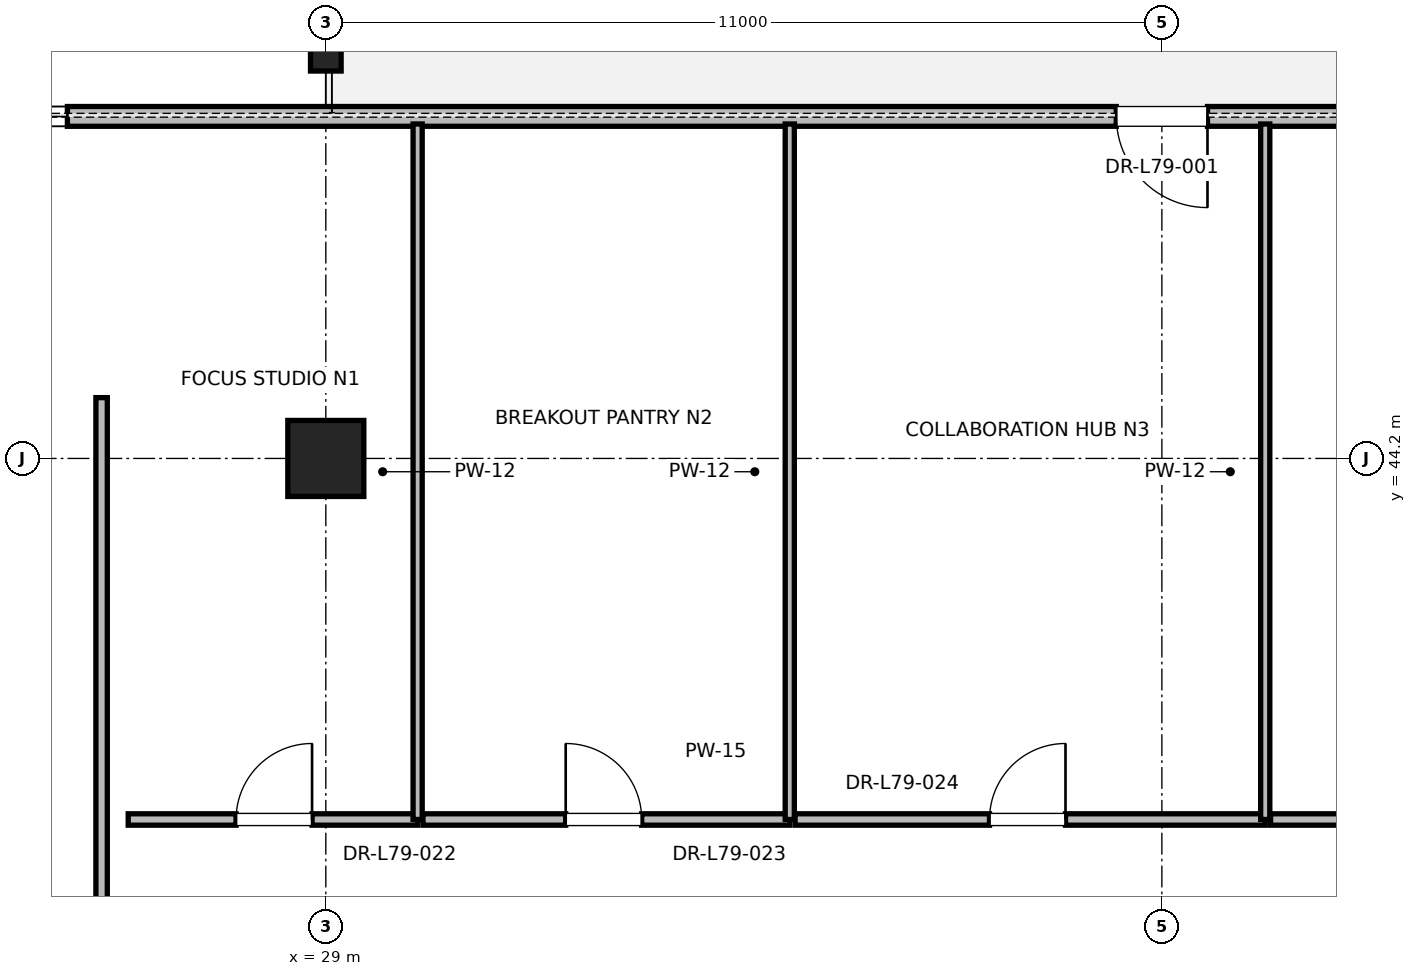
"""IFC4 building model, lengths in metres.
Left out: names, types, materials, properties, quantities, classifications, styles, units other than length and angle.
Written with IfcOpenShell. Run it as: python <this file> out.ifc"""

import sys

from ifc_helpers import new_model, si_unit, direction, frame, frame_2d, origin, origin_2d, place, context, subcontext, project, spatial, rectangle, i_section, extrude, element, fill, save


model = new_model("IFC4")
c1 = context("Model", 3, precision=1e-05, world=origin(), true_north=direction((0.0, 1.0)))
c2 = subcontext(c1, "Body", "Model", "MODEL_VIEW")
j1 = project(units=[si_unit("LENGTHUNIT", "METRE"), si_unit("PLANEANGLEUNIT", "RADIAN")], contexts=[c1])
p1 = place(None, origin())
s1 = spatial("IfcSite", under=j1, at=p1, CompositionType="ELEMENT")
p2 = place(p1, origin())
s2 = spatial("IfcBuilding", under=s1, at=p2, CompositionType="ELEMENT")
p3 = place(p2, frame((0.0, 0.0, 338.8)))
s3 = spatial("IfcBuildingStorey", under=s2, at=p3, CompositionType="ELEMENT", Elevation=338.8)
p4 = place(p3, frame((29.0, 44.2, 0.0), z_axis=(0.0, 0.0, 1.0), x_axis=(1.0, 0.0, 0.0)))
e1 = element("IfcColumn", 1, at=p4, inside=s3, PredefinedType="COLUMN", context=c2, shape_type="SweptSolid", body=[
    extrude(rectangle(XDim=1.0, YDim=1.0, at=origin_2d()), origin(), (0.0, 0.0, 1.0), 4.0),
])
p5 = place(p3, frame((29.0, 49.5, 0.0), z_axis=(0.0, 0.0, 1.0), x_axis=(1.0, 0.0, 0.0)))
e2 = element("IfcColumn", 2, at=p5, inside=s3, PredefinedType="COLUMN", context=c2, shape_type="SweptSolid", body=[
    extrude(i_section(OverallWidth=0.403, OverallDepth=0.406, WebThickness=0.027, FlangeThickness=0.043, FilletRadius=0.015, at=origin_2d()), origin(), (0.0, 0.0, 1.0), 4.0),
])
p6 = place(p3, frame((60.2, 48.7, 0.0), z_axis=(0.0, 0.0, 1.0), x_axis=(-1.0, 0.0, 0.0)))
e3 = element("IfcWall", 3, at=p6, inside=s3, PredefinedType="PARAPET", context=c2, shape_type="SweptSolid", body=[
    extrude(rectangle(XDim=40.4, YDim=0.26, at=frame_2d((20.2, 0.0))), origin(), (0.0, 0.0, 1.0), 3.7),
])
p7 = place(p6, frame((4.2, 0.0, 0.85)))
e4 = element("IfcOpeningElement", 4, at=p7, cuts=e3, PredefinedType="OPENING", context=c2, shape_type="SweptSolid", body=[
    extrude(rectangle(XDim=1.6, YDim=2.1, at=frame_2d((0.8, 1.05))), frame((0.0, 0.13, 0.0), z_axis=(0.0, -1.0, 0.0), x_axis=(1.0, 0.0, 0.0)), (0.0, 0.0, 1.0), 0.26),
])
p8 = place(p6, frame((19.6, 0.0, 0.0)))
e5 = element("IfcOpeningElement", 5, at=p8, cuts=e3, PredefinedType="OPENING", context=c2, shape_type="SweptSolid", body=[
    extrude(rectangle(XDim=1.2, YDim=2.2, at=frame_2d((0.6, 1.1))), frame((0.0, 0.13, 0.0), z_axis=(0.0, -1.0, 0.0), x_axis=(1.0, 0.0, 0.0)), (0.0, 0.0, 1.0), 0.26),
])
p9 = place(p6, frame((34.6, 0.0, 0.85)))
e6 = element("IfcOpeningElement", 6, at=p9, cuts=e3, PredefinedType="OPENING", context=c2, shape_type="SweptSolid", body=[
    extrude(rectangle(XDim=1.6, YDim=2.1, at=frame_2d((0.8, 1.05))), frame((0.0, 0.13, 0.0), z_axis=(0.0, -1.0, 0.0), x_axis=(1.0, 0.0, 0.0)), (0.0, 0.0, 1.0), 0.26),
])
p10 = place(p3, frame((26.4, 39.45, 0.0), z_axis=(0.0, 0.0, 1.0), x_axis=(1.0, 0.0, 0.0)))
e7 = element("IfcWall", 7, at=p10, inside=s3, PredefinedType="PARTITIONING", context=c2, shape_type="SweptSolid", body=[
    extrude(rectangle(XDim=3.808, YDim=0.15, at=frame_2d((1.904, 0.0))), origin(), (0.0, 0.0, 1.0), 2.753),
])
p11 = place(p10, frame((1.419, 0.0, 0.0)))
e8 = element("IfcOpeningElement", 8, at=p11, cuts=e7, PredefinedType="OPENING", context=c2, shape_type="SweptSolid", body=[
    extrude(rectangle(XDim=1.0, YDim=2.15, at=frame_2d((0.5, 1.075))), frame((0.0, 0.075, 0.0), z_axis=(0.0, -1.0, 0.0), x_axis=(1.0, 0.0, 0.0)), (0.0, 0.0, 1.0), 0.15),
])
p12 = place(p3, frame((30.208, 39.45, 0.0), z_axis=(0.0, 0.0, 1.0), x_axis=(0.0, 1.0, 0.0)))
e9 = element("IfcWall", 9, at=p12, inside=s3, PredefinedType="PARTITIONING", context=c2, shape_type="SweptSolid", body=[
    extrude(rectangle(XDim=9.15, YDim=0.12, at=frame_2d((4.575, 0.0))), origin(), (0.0, 0.0, 1.0), 2.33),
])
p13 = place(p3, frame((30.278, 39.45, 0.0), z_axis=(0.0, 0.0, 1.0), x_axis=(1.0, 0.0, 0.0)))
e10 = element("IfcWall", 10, at=p13, inside=s3, PredefinedType="PARTITIONING", context=c2, shape_type="SweptSolid", body=[
    extrude(rectangle(XDim=4.826, YDim=0.15, at=frame_2d((2.413, 0.0))), origin(), (0.0, 0.0, 1.0), 2.85),
])
p14 = place(p13, frame((1.878, 0.0, 0.0)))
e11 = element("IfcOpeningElement", 11, at=p14, cuts=e10, PredefinedType="OPENING", context=c2, shape_type="SweptSolid", body=[
    extrude(rectangle(XDim=1.0, YDim=2.15, at=frame_2d((0.5, 1.075))), frame((0.0, 0.075, 0.0), z_axis=(0.0, -1.0, 0.0), x_axis=(1.0, 0.0, 0.0)), (0.0, 0.0, 1.0), 0.15),
])
p15 = place(p3, frame((35.104, 39.45, 0.0), z_axis=(0.0, 0.0, 1.0), x_axis=(0.0, 1.0, 0.0)))
e12 = element("IfcWall", 12, at=p15, inside=s3, PredefinedType="PARTITIONING", context=c2, shape_type="SweptSolid", body=[
    extrude(rectangle(XDim=9.15, YDim=0.12, at=frame_2d((4.575, 0.0))), origin(), (0.0, 0.0, 1.0), 2.33),
])
p16 = place(p3, frame((35.174, 39.45, 0.0), z_axis=(0.0, 0.0, 1.0), x_axis=(1.0, 0.0, 0.0)))
e13 = element("IfcWall", 13, at=p16, inside=s3, PredefinedType="PARTITIONING", context=c2, shape_type="SweptSolid", body=[
    extrude(rectangle(XDim=6.186, YDim=0.15, at=frame_2d((3.093, 0.0))), origin(), (0.0, 0.0, 1.0), 2.85),
])
p17 = place(p16, frame((2.558, 0.0, 0.0)))
e14 = element("IfcOpeningElement", 14, at=p17, cuts=e13, PredefinedType="OPENING", context=c2, shape_type="SweptSolid", body=[
    extrude(rectangle(XDim=1.0, YDim=2.15, at=frame_2d((0.5, 1.075))), frame((0.0, 0.075, 0.0), z_axis=(0.0, -1.0, 0.0), x_axis=(1.0, 0.0, 0.0)), (0.0, 0.0, 1.0), 0.15),
])
p18 = place(p3, frame((41.36, 39.45, 0.0), z_axis=(0.0, 0.0, 1.0), x_axis=(0.0, 1.0, 0.0)))
e15 = element("IfcWall", 15, at=p18, inside=s3, PredefinedType="PARTITIONING", context=c2, shape_type="SweptSolid", body=[
    extrude(rectangle(XDim=9.15, YDim=0.12, at=frame_2d((4.575, 0.0))), origin(), (0.0, 0.0, 1.0), 2.33),
])
p19 = place(p3, frame((41.43, 39.45, 0.0), z_axis=(0.0, 0.0, 1.0), x_axis=(1.0, 0.0, 0.0)))
e16 = element("IfcWall", 16, at=p19, inside=s3, PredefinedType="PARTITIONING", context=c2, shape_type="SweptSolid", body=[
    extrude(rectangle(XDim=7.002, YDim=0.15, at=frame_2d((3.501, 0.0))), origin(), (0.0, 0.0, 1.0), 2.85),
])
p20 = place(p19, frame((2.966, 0.0, 0.0)))
e17 = element("IfcOpeningElement", 17, at=p20, cuts=e16, PredefinedType="OPENING", context=c2, shape_type="SweptSolid", body=[
    extrude(rectangle(XDim=1.0, YDim=2.15, at=frame_2d((0.5, 1.075))), frame((0.0, 0.075, 0.0), z_axis=(0.0, -1.0, 0.0), x_axis=(1.0, 0.0, 0.0)), (0.0, 0.0, 1.0), 0.15),
])
p21 = place(p3, frame((26.05, 33.17, 0.0), z_axis=(0.0, 0.0, 1.0), x_axis=(0.0, 1.0, 0.0)))
e18 = element("IfcWall", 18, at=p21, inside=s3, PredefinedType="PARTITIONING", context=c2, shape_type="SweptSolid", body=[
    extrude(rectangle(XDim=11.83, YDim=0.15, at=frame_2d((5.915, 0.0))), origin(), (0.0, 0.0, 1.0), 2.753),
])
p22 = place(p21, frame((1.115, 0.0, 0.0)))
e19 = element("IfcOpeningElement", 19, at=p22, cuts=e18, PredefinedType="OPENING", context=c2, shape_type="SweptSolid", body=[
    extrude(rectangle(XDim=1.0, YDim=2.15, at=frame_2d((0.5, 1.075))), frame((0.0, 0.075, 0.0), z_axis=(0.0, -1.0, 0.0), x_axis=(1.0, 0.0, 0.0)), (0.0, 0.0, 1.0), 0.15),
])
p23 = place(p8, origin())
e20 = element("IfcDoor", 20, at=p23, inside=s3, OperationType="SINGLE_SWING_LEFT", PredefinedType="DOOR", context=c2, shape_type="SweptSolid", body=[
    extrude(rectangle(XDim=1.2, YDim=2.2, at=frame_2d((0.6, 1.1))), frame((0.0, 0.025, 0.0), z_axis=(0.0, -1.0, 0.0), x_axis=(1.0, 0.0, 0.0)), (0.0, 0.0, 1.0), 0.05),
])
fill(e5, e20)
p24 = place(p9, origin())
e21 = element("IfcWindow", 21, at=p24, inside=s3, PartitioningType="SINGLE_PANEL", PredefinedType="WINDOW", context=c2, shape_type="SweptSolid", body=[
    extrude(rectangle(XDim=1.6, YDim=2.1, at=frame_2d((0.8, 1.05))), frame((0.0, 0.03, 0.0), z_axis=(0.0, -1.0, 0.0), x_axis=(1.0, 0.0, 0.0)), (0.0, 0.0, 1.0), 0.06),
])
fill(e6, e21)
p25 = place(p11, origin())
e22 = element("IfcDoor", 22, at=p25, inside=s3, OperationType="SINGLE_SWING_RIGHT", PredefinedType="DOOR", context=c2, shape_type="SweptSolid", body=[
    extrude(rectangle(XDim=1.0, YDim=2.15, at=frame_2d((0.5, 1.075))), frame((0.0, 0.025, 0.0), z_axis=(0.0, -1.0, 0.0), x_axis=(1.0, 0.0, 0.0)), (0.0, 0.0, 1.0), 0.05),
])
fill(e8, e22)
p26 = place(p14, origin())
e23 = element("IfcDoor", 23, at=p26, inside=s3, OperationType="SINGLE_SWING_LEFT", PredefinedType="DOOR", context=c2, shape_type="SweptSolid", body=[
    extrude(rectangle(XDim=1.0, YDim=2.15, at=frame_2d((0.5, 1.075))), frame((0.0, 0.025, 0.0), z_axis=(0.0, -1.0, 0.0), x_axis=(1.0, 0.0, 0.0)), (0.0, 0.0, 1.0), 0.05),
])
fill(e11, e23)
p27 = place(p17, origin())
e24 = element("IfcDoor", 24, at=p27, inside=s3, OperationType="SINGLE_SWING_RIGHT", PredefinedType="DOOR", context=c2, shape_type="SweptSolid", body=[
    extrude(rectangle(XDim=1.0, YDim=2.15, at=frame_2d((0.5, 1.075))), frame((0.0, 0.025, 0.0), z_axis=(0.0, -1.0, 0.0), x_axis=(1.0, 0.0, 0.0)), (0.0, 0.0, 1.0), 0.05),
])
fill(e14, e24)
save(model, sys.argv[1])
